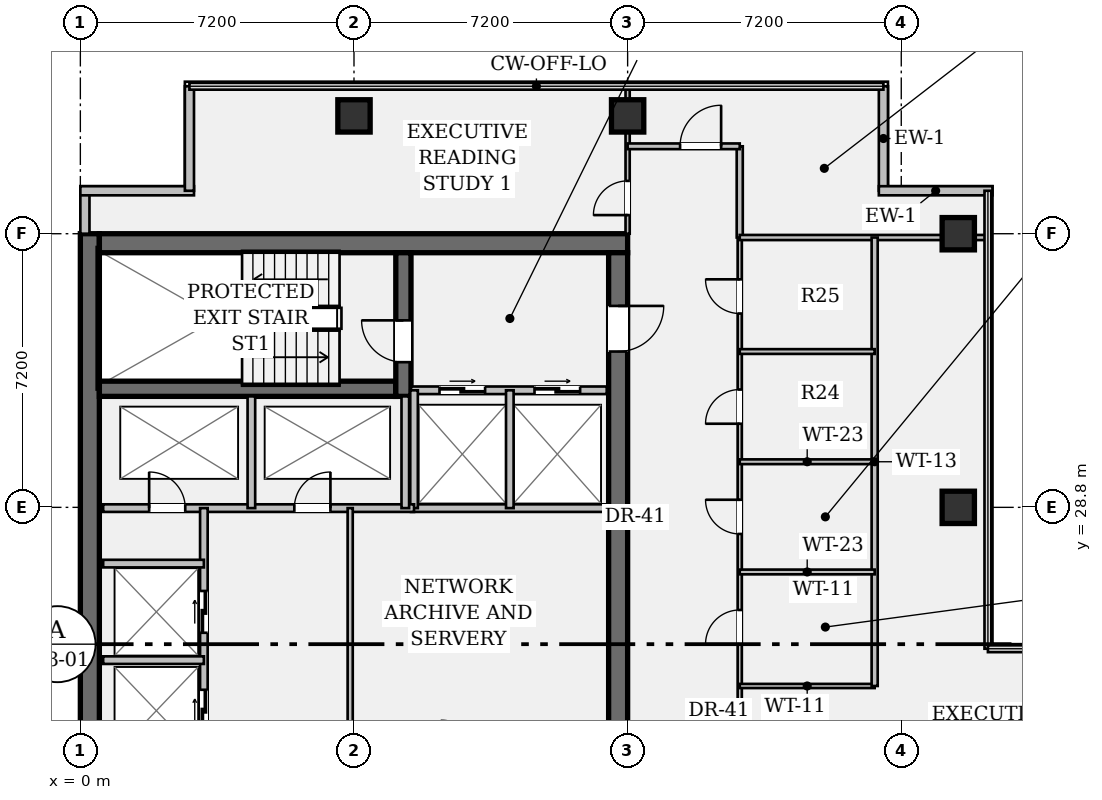
"""IFC4 building model, lengths in metres.
Left out: names, types, materials, properties, quantities, classifications, styles, units other than length and angle.
Written with IfcOpenShell. Run it as: python <this file> out.ifc"""

import sys

from ifc_helpers import new_model, si_unit, direction, frame, frame_2d, origin, origin_2d, place, context, subcontext, project, spatial, rectangle, hollow_rectangle, extrude, element, fill, save


model = new_model("IFC4")
c1 = context("Model", 3, precision=1e-05, world=origin(), true_north=direction((0.0, 1.0)))
c2 = subcontext(c1, "Body", "Model", "MODEL_VIEW")
j1 = project(units=[si_unit("LENGTHUNIT", "METRE"), si_unit("PLANEANGLEUNIT", "RADIAN")], contexts=[c1])
p1 = place(None, origin())
s1 = spatial("IfcSite", under=j1, at=p1, CompositionType="ELEMENT")
p2 = place(p1, origin())
s2 = spatial("IfcBuilding", under=s1, at=p2, CompositionType="ELEMENT")
p3 = place(p2, frame((0.0, 0.0, 180.25)))
s3 = spatial("IfcBuildingStorey", under=s2, at=p3, CompositionType="ELEMENT", Elevation=180.25)
p4 = place(p3, frame((0.25, 7.2, 0.0), z_axis=(0.0, 0.0, 1.0), x_axis=(0.0, 1.0, 0.0)))
e1 = element("IfcWall", 1, at=p4, inside=s3, PredefinedType="SHEAR", context=c2, shape_type="SweptSolid", body=[
    extrude(rectangle(XDim=28.8, YDim=0.5, at=frame_2d((14.4, 0.0))), origin(), (0.0, 0.0, 1.0), 3.24),
])
p5 = place(p3, frame((0.5, 35.75, 0.0), z_axis=(0.0, 0.0, 1.0), x_axis=(1.0, 0.0, 0.0)))
e2 = element("IfcWall", 2, at=p5, inside=s3, PredefinedType="SHEAR", context=c2, shape_type="SweptSolid", body=[
    extrude(rectangle(XDim=13.9, YDim=0.5, at=frame_2d((6.95, 0.0))), origin(), (0.0, 0.0, 1.0), 3.24),
])
p6 = place(p3, frame((14.15, 35.5, 0.0), z_axis=(0.0, 0.0, 1.0), x_axis=(0.0, -1.0, 0.0)))
e3 = element("IfcWall", 3, at=p6, inside=s3, PredefinedType="SHEAR", context=c2, shape_type="SweptSolid", body=[
    extrude(rectangle(XDim=27.8, YDim=0.5, at=frame_2d((13.9, 0.0))), origin(), (0.0, 0.0, 1.0), 3.24),
])
p7 = place(p6, frame((1.4, 0.0, 0.0)))
e4 = element("IfcOpeningElement", 4, at=p7, cuts=e3, PredefinedType="OPENING", context=c2, shape_type="SweptSolid", body=[
    extrude(rectangle(XDim=1.2, YDim=2.15, at=frame_2d((0.6, 1.075))), frame((0.0, 0.262, 0.0), z_axis=(0.0, -1.0, 0.0), x_axis=(1.0, 0.0, 0.0)), (0.0, 0.0, 1.0), 0.524),
])
p8 = place(p6, frame((25.35, 0.0, 0.0)))
e5 = element("IfcOpeningElement", 5, at=p8, cuts=e3, PredefinedType="OPENING", context=c2, shape_type="SweptSolid", body=[
    extrude(rectangle(XDim=1.2, YDim=2.15, at=frame_2d((0.6, 1.075))), frame((0.0, 0.262, 0.0), z_axis=(0.0, -1.0, 0.0), x_axis=(1.0, 0.0, 0.0)), (0.0, 0.0, 1.0), 0.524),
])
p9 = place(p6, frame((14.7, 0.0, 0.0)))
e6 = element("IfcOpeningElement", 6, at=p9, cuts=e3, PredefinedType="OPENING", context=c2, shape_type="SweptSolid", body=[
    extrude(rectangle(XDim=1.6, YDim=2.2, at=frame_2d((0.8, 1.1))), frame((0.0, 0.262, 0.0), z_axis=(0.0, -1.0, 0.0), x_axis=(1.0, 0.0, 0.0)), (0.0, 0.0, 1.0), 0.524),
])
p10 = place(p3, frame((0.5, 31.92, 0.0), z_axis=(0.0, 0.0, 1.0), x_axis=(1.0, 0.0, 0.0)))
e7 = element("IfcWall", 7, at=p10, inside=s3, PredefinedType="SHEAR", context=c2, shape_type="SweptSolid", body=[
    extrude(rectangle(XDim=7.8, YDim=0.4, at=frame_2d((3.9, 0.0))), origin(), (0.0, 0.0, 1.0), 3.24),
])
p11 = place(p3, frame((8.5, 31.72, 0.0), z_axis=(0.0, 0.0, 1.0), x_axis=(0.0, 1.0, 0.0)))
e8 = element("IfcWall", 8, at=p11, inside=s3, PredefinedType="SHEAR", context=c2, shape_type="SweptSolid", body=[
    extrude(rectangle(XDim=3.78, YDim=0.4, at=frame_2d((1.89, 0.0))), origin(), (0.0, 0.0, 1.0), 3.24),
])
p12 = place(p11, frame((0.9, 0.0, 0.0)))
e9 = element("IfcOpeningElement", 9, at=p12, cuts=e8, PredefinedType="OPENING", context=c2, shape_type="SweptSolid", body=[
    extrude(rectangle(XDim=1.1, YDim=2.15, at=frame_2d((0.55, 1.075))), frame((0.0, 0.212, 0.0), z_axis=(0.0, -1.0, 0.0), x_axis=(1.0, 0.0, 0.0)), (0.0, 0.0, 1.0), 0.424),
])
for number, where, z_axis, x_axis in (
    (10, (7.2, 39.1, 0.0), (0.0, 0.0, 1.0), (1.0, 0.0, 0.0)),
    (11, (14.4, 39.1, 0.0), (0.0, 0.0, 1.0), (1.0, 0.0, 0.0)),
    (12, (23.1, 28.8, 0.0), (0.0, 0.0, 1.0), (1.0, 0.0, 0.0)),
    (13, (23.1, 36.0, 0.0), (0.0, 0.0, 1.0), (1.0, 0.0, 0.0)),
):
    element("IfcColumn", number, at=place(p3, frame(where, z_axis=z_axis, x_axis=x_axis)), inside=s3, PredefinedType="COLUMN", context=c2, shape_type="SweptSolid", body=[
        extrude(hollow_rectangle(XDim=0.85, YDim=0.85, WallThickness=0.05, at=origin_2d()), origin(), (0.0, 0.0, 1.0), 3.24),
    ])
p13 = place(p3, frame((0.12, 36.0, 0.0), z_axis=(0.0, 0.0, 1.0), x_axis=(0.0, 1.0, 0.0)))
e14 = element("IfcWall", 14, at=p13, inside=s3, PredefinedType="STANDARD", context=c2, shape_type="SweptSolid", body=[
    extrude(rectangle(XDim=1.13, YDim=0.24, at=frame_2d((0.565, 0.0))), origin(), (0.0, 0.0, 1.0), 3.24),
])
p14 = place(p3, frame((0.0, 37.13, 0.0), z_axis=(0.0, 0.0, 1.0), x_axis=(1.0, 0.0, 0.0)))
e15 = element("IfcWall", 15, at=p14, inside=s3, PredefinedType="STANDARD", context=c2, shape_type="SweptSolid", body=[
    extrude(rectangle(XDim=2.99, YDim=0.24, at=frame_2d((1.495, 0.0))), origin(), (0.0, 0.0, 1.0), 3.24),
])
for number, where, z_axis, x_axis in (
    (16, (2.87, 37.13, 0.0), (0.0, 0.0, 1.0), (0.0, 1.0, 0.0)),
    (17, (21.13, 39.88, 0.0), (0.0, 0.0, 1.0), (0.0, -1.0, 0.0)),
):
    element("IfcWall", number, at=place(p3, frame(where, z_axis=z_axis, x_axis=x_axis)), inside=s3, PredefinedType="STANDARD", context=c2, shape_type="SweptSolid", body=[
        extrude(rectangle(XDim=2.75, YDim=0.24, at=frame_2d((1.375, 0.0))), origin(), (0.0, 0.0, 1.0), 3.24),
    ])
p15 = place(p3, frame((21.01, 37.13, 0.0), z_axis=(0.0, 0.0, 1.0), x_axis=(1.0, 0.0, 0.0)))
e18 = element("IfcWall", 18, at=p15, inside=s3, PredefinedType="STANDARD", context=c2, shape_type="SweptSolid", body=[
    extrude(rectangle(XDim=2.99, YDim=0.24, at=frame_2d((1.495, 0.0))), origin(), (0.0, 0.0, 1.0), 3.24),
])
p16 = place(p3, frame((8.7, 31.88, 0.0), z_axis=(0.0, 0.0, 1.0), x_axis=(1.0, 0.0, 0.0)))
e19 = element("IfcWall", 19, at=p16, inside=s3, PredefinedType="PARTITIONING", context=c2, shape_type="SweptSolid", body=[
    extrude(rectangle(XDim=5.15, YDim=0.2, at=frame_2d((2.575, 0.0))), origin(), (0.0, 0.0, 1.0), 3.24),
])
p17 = place(p16, frame((0.75, 0.0, 0.0)))
e20 = element("IfcOpeningElement", 20, at=p17, cuts=e19, PredefinedType="OPENING", context=c2, shape_type="SweptSolid", body=[
    extrude(rectangle(XDim=1.2, YDim=2.2, at=frame_2d((0.6, 1.1))), frame((0.0, 0.112, 0.0), z_axis=(0.0, -1.0, 0.0), x_axis=(1.0, 0.0, 0.0)), (0.0, 0.0, 1.0), 0.224),
])
p18 = place(p16, frame((3.25, 0.0, 0.0)))
e21 = element("IfcOpeningElement", 21, at=p18, cuts=e19, PredefinedType="OPENING", context=c2, shape_type="SweptSolid", body=[
    extrude(rectangle(XDim=1.2, YDim=2.2, at=frame_2d((0.6, 1.1))), frame((0.0, 0.112, 0.0), z_axis=(0.0, -1.0, 0.0), x_axis=(1.0, 0.0, 0.0)), (0.0, 0.0, 1.0), 0.224),
])
p19 = place(p3, frame((8.7, 28.78, 0.0), z_axis=(0.0, 0.0, 1.0), x_axis=(1.0, 0.0, 0.0)))
e22 = element("IfcWall", 22, at=p19, inside=s3, PredefinedType="PARTITIONING", context=c2, shape_type="SweptSolid", body=[
    extrude(rectangle(XDim=5.15, YDim=0.2, at=frame_2d((2.575, 0.0))), origin(), (0.0, 0.0, 1.0), 3.24),
])
for number, where, z_axis, x_axis in (
    (23, (8.78, 28.78, 0.0), (0.0, 0.0, 1.0), (0.0, 1.0, 0.0)),
    (24, (11.3, 28.78, 0.0), (0.0, 0.0, 1.0), (0.0, 1.0, 0.0)),
):
    element("IfcWall", number, at=place(p3, frame(where, z_axis=z_axis, x_axis=x_axis)), inside=s3, PredefinedType="PARTITIONING", context=c2, shape_type="SweptSolid", body=[
        extrude(rectangle(XDim=3.1, YDim=0.2, at=frame_2d((1.55, 0.0))), origin(), (0.0, 0.0, 1.0), 3.24),
    ])
p20 = place(p3, frame((0.6, 28.78, 0.0), z_axis=(0.0, 0.0, 1.0), x_axis=(1.0, 0.0, 0.0)))
e25 = element("IfcWall", 25, at=p20, inside=s3, PredefinedType="PARTITIONING", context=c2, shape_type="SweptSolid", body=[
    extrude(rectangle(XDim=8.18, YDim=0.2, at=frame_2d((4.09, 0.0))), origin(), (0.0, 0.0, 1.0), 3.24),
])
p21 = place(p20, frame((1.21, 0.0, 0.0)))
e26 = element("IfcOpeningElement", 26, at=p21, cuts=e25, PredefinedType="OPENING", context=c2, shape_type="SweptSolid", body=[
    extrude(rectangle(XDim=0.95, YDim=2.15, at=frame_2d((0.475, 1.075))), frame((0.0, 0.112, 0.0), z_axis=(0.0, -1.0, 0.0), x_axis=(1.0, 0.0, 0.0)), (0.0, 0.0, 1.0), 0.224),
])
p22 = place(p20, frame((5.03, 0.0, 0.0)))
e27 = element("IfcOpeningElement", 27, at=p22, cuts=e25, PredefinedType="OPENING", context=c2, shape_type="SweptSolid", body=[
    extrude(rectangle(XDim=0.95, YDim=2.15, at=frame_2d((0.475, 1.075))), frame((0.0, 0.112, 0.0), z_axis=(0.0, -1.0, 0.0), x_axis=(1.0, 0.0, 0.0)), (0.0, 0.0, 1.0), 0.224),
])
for number, where, z_axis, x_axis in (
    (28, (4.5, 28.78, 0.0), (0.0, 0.0, 1.0), (0.0, 1.0, 0.0)),
    (29, (8.55, 28.78, 0.0), (0.0, 0.0, 1.0), (0.0, 1.0, 0.0)),
):
    element("IfcWall", number, at=place(p3, frame(where, z_axis=z_axis, x_axis=x_axis)), inside=s3, PredefinedType="PARTITIONING", context=c2, shape_type="SweptSolid", body=[
        extrude(rectangle(XDim=2.94, YDim=0.2, at=frame_2d((1.47, 0.0))), origin(), (0.0, 0.0, 1.0), 3.24),
    ])
p23 = place(p3, frame((3.25, 15.7, 0.0), z_axis=(0.0, 0.0, 1.0), x_axis=(0.0, 1.0, 0.0)))
e30 = element("IfcWall", 30, at=p23, inside=s3, PredefinedType="PARTITIONING", context=c2, shape_type="SweptSolid", body=[
    extrude(rectangle(XDim=13.08, YDim=0.2, at=frame_2d((6.54, 0.0))), origin(), (0.0, 0.0, 1.0), 3.24),
])
p24 = place(p23, frame((0.9, 0.0, 0.0)))
e31 = element("IfcOpeningElement", 31, at=p24, cuts=e30, PredefinedType="OPENING", context=c2, shape_type="SweptSolid", body=[
    extrude(rectangle(XDim=1.1, YDim=2.2, at=frame_2d((0.55, 1.1))), frame((0.0, 0.112, 0.0), z_axis=(0.0, -1.0, 0.0), x_axis=(1.0, 0.0, 0.0)), (0.0, 0.0, 1.0), 0.224),
])
p25 = place(p23, frame((3.5, 0.0, 0.0)))
e32 = element("IfcOpeningElement", 32, at=p25, cuts=e30, PredefinedType="OPENING", context=c2, shape_type="SweptSolid", body=[
    extrude(rectangle(XDim=1.1, YDim=2.2, at=frame_2d((0.55, 1.1))), frame((0.0, 0.112, 0.0), z_axis=(0.0, -1.0, 0.0), x_axis=(1.0, 0.0, 0.0)), (0.0, 0.0, 1.0), 0.224),
])
p26 = place(p23, frame((7.2, 0.0, 0.0)))
e33 = element("IfcOpeningElement", 33, at=p26, cuts=e30, PredefinedType="OPENING", context=c2, shape_type="SweptSolid", body=[
    extrude(rectangle(XDim=1.1, YDim=2.2, at=frame_2d((0.55, 1.1))), frame((0.0, 0.112, 0.0), z_axis=(0.0, -1.0, 0.0), x_axis=(1.0, 0.0, 0.0)), (0.0, 0.0, 1.0), 0.224),
])
p27 = place(p23, frame((9.8, 0.0, 0.0)))
e34 = element("IfcOpeningElement", 34, at=p27, cuts=e30, PredefinedType="OPENING", context=c2, shape_type="SweptSolid", body=[
    extrude(rectangle(XDim=1.1, YDim=2.2, at=frame_2d((0.55, 1.1))), frame((0.0, 0.112, 0.0), z_axis=(0.0, -1.0, 0.0), x_axis=(1.0, 0.0, 0.0)), (0.0, 0.0, 1.0), 0.224),
])
for number, where, z_axis, x_axis in (
    (35, (0.6, 24.78, 0.0), (0.0, 0.0, 1.0), (1.0, 0.0, 0.0)),
    (36, (0.6, 27.32, 0.0), (0.0, 0.0, 1.0), (1.0, 0.0, 0.0)),
):
    element("IfcWall", number, at=place(p3, frame(where, z_axis=z_axis, x_axis=x_axis)), inside=s3, PredefinedType="PARTITIONING", context=c2, shape_type="SweptSolid", body=[
        extrude(rectangle(XDim=2.65, YDim=0.2, at=frame_2d((1.325, 0.0))), origin(), (0.0, 0.0, 1.0), 3.24),
    ])
p28 = place(p3, frame((7.1, 22.2, 0.0), z_axis=(0.0, 0.0, 1.0), x_axis=(0.0, 1.0, 0.0)))
e37 = element("IfcWall", 37, at=p28, inside=s3, PredefinedType="PARTITIONING", context=c2, shape_type="SweptSolid", body=[
    extrude(rectangle(XDim=6.58, YDim=0.135, at=frame_2d((3.29, 0.0))), origin(), (0.0, 0.0, 1.0), 3.24),
])
p29 = place(p3, frame((17.35, 17.35, 0.0), z_axis=(0.0, 0.0, 1.0), x_axis=(0.0, 1.0, 0.0)))
e38 = element("IfcWall", 38, at=p29, inside=s3, PredefinedType="PARTITIONING", context=c2, shape_type="SweptSolid", body=[
    extrude(rectangle(XDim=18.55, YDim=0.11, at=frame_2d((9.275, 0.0))), origin(), (0.0, 0.0, 1.0), 2.603),
])
p30 = place(p29, frame((7.85, 0.0, 0.0)))
e39 = element("IfcOpeningElement", 39, at=p30, cuts=e38, PredefinedType="OPENING", context=c2, shape_type="SweptSolid", body=[
    extrude(rectangle(XDim=0.9, YDim=2.15, at=frame_2d((0.45, 1.075))), frame((0.0, 0.067, 0.0), z_axis=(0.0, -1.0, 0.0), x_axis=(1.0, 0.0, 0.0)), (0.0, 0.0, 1.0), 0.134),
])
p31 = place(p29, frame((10.75, 0.0, 0.0)))
e40 = element("IfcOpeningElement", 40, at=p31, cuts=e38, PredefinedType="OPENING", context=c2, shape_type="SweptSolid", body=[
    extrude(rectangle(XDim=0.9, YDim=2.15, at=frame_2d((0.45, 1.075))), frame((0.0, 0.067, 0.0), z_axis=(0.0, -1.0, 0.0), x_axis=(1.0, 0.0, 0.0)), (0.0, 0.0, 1.0), 0.134),
])
p32 = place(p29, frame((13.65, 0.0, 0.0)))
e41 = element("IfcOpeningElement", 41, at=p32, cuts=e38, PredefinedType="OPENING", context=c2, shape_type="SweptSolid", body=[
    extrude(rectangle(XDim=0.9, YDim=2.15, at=frame_2d((0.45, 1.075))), frame((0.0, 0.067, 0.0), z_axis=(0.0, -1.0, 0.0), x_axis=(1.0, 0.0, 0.0)), (0.0, 0.0, 1.0), 0.134),
])
p33 = place(p29, frame((16.55, 0.0, 0.0)))
e42 = element("IfcOpeningElement", 42, at=p33, cuts=e38, PredefinedType="OPENING", context=c2, shape_type="SweptSolid", body=[
    extrude(rectangle(XDim=0.9, YDim=2.15, at=frame_2d((0.45, 1.075))), frame((0.0, 0.067, 0.0), z_axis=(0.0, -1.0, 0.0), x_axis=(1.0, 0.0, 0.0)), (0.0, 0.0, 1.0), 0.134),
])
p34 = place(p3, frame((14.4, 36.0, 0.0), z_axis=(0.0, 0.0, 1.0), x_axis=(0.0, 1.0, 0.0)))
e43 = element("IfcWall", 43, at=p34, inside=s3, PredefinedType="PARTITIONING", context=c2, shape_type="SweptSolid", body=[
    extrude(rectangle(XDim=3.88, YDim=0.11, at=frame_2d((1.94, 0.0))), origin(), (0.0, 0.0, 1.0), 2.603),
])
p35 = place(p34, frame((0.49, 0.0, 0.0)))
e44 = element("IfcOpeningElement", 44, at=p35, cuts=e43, PredefinedType="OPENING", context=c2, shape_type="SweptSolid", body=[
    extrude(rectangle(XDim=0.9, YDim=2.15, at=frame_2d((0.45, 1.075))), frame((0.0, 0.067, 0.0), z_axis=(0.0, -1.0, 0.0), x_axis=(1.0, 0.0, 0.0)), (0.0, 0.0, 1.0), 0.134),
])
p36 = place(p3, frame((17.35, 35.9, 0.0), z_axis=(0.0, 0.0, 1.0), x_axis=(0.0, 1.0, 0.0)))
e45 = element("IfcWall", 45, at=p36, inside=s3, PredefinedType="PARTITIONING", context=c2, shape_type="SweptSolid", body=[
    extrude(rectangle(XDim=2.4, YDim=0.16, at=frame_2d((1.2, 0.0))), origin(), (0.0, 0.0, 1.0), 2.603),
])
p37 = place(p3, frame((14.4, 38.3, 0.0), z_axis=(0.0, 0.0, 1.0), x_axis=(1.0, 0.0, 0.0)))
e46 = element("IfcWall", 46, at=p37, inside=s3, PredefinedType="PARTITIONING", context=c2, shape_type="SweptSolid", body=[
    extrude(rectangle(XDim=2.95, YDim=0.15, at=frame_2d((1.475, 0.0))), origin(), (0.0, 0.0, 1.0), 2.603),
])
p38 = place(p37, frame((1.38, 0.0, 0.0)))
e47 = element("IfcOpeningElement", 47, at=p38, cuts=e46, PredefinedType="OPENING", context=c2, shape_type="SweptSolid", body=[
    extrude(rectangle(XDim=1.08, YDim=2.15, at=frame_2d((0.54, 1.075))), frame((0.0, 0.087, 0.0), z_axis=(0.0, -1.0, 0.0), x_axis=(1.0, 0.0, 0.0)), (0.0, 0.0, 1.0), 0.174),
])
p39 = place(p3, frame((17.35, 35.9, 0.0), z_axis=(0.0, 0.0, 1.0), x_axis=(1.0, 0.0, 0.0)))
e48 = element("IfcWall", 48, at=p39, inside=s3, PredefinedType="PARTITIONING", context=c2, shape_type="SweptSolid", body=[
    extrude(rectangle(XDim=6.53, YDim=0.135, at=frame_2d((3.265, 0.0))), origin(), (0.0, 0.0, 1.0), 2.603),
])
p40 = place(p3, frame((17.35, 24.1, 0.0), z_axis=(0.0, 0.0, 1.0), x_axis=(1.0, 0.0, 0.0)))
e49 = element("IfcWall", 49, at=p40, inside=s3, PredefinedType="PARTITIONING", context=c2, shape_type="SweptSolid", body=[
    extrude(rectangle(XDim=3.55, YDim=0.11, at=frame_2d((1.775, 0.0))), origin(), (0.0, 0.0, 1.0), 2.808),
])
p41 = place(p3, frame((20.9, 24.1, 0.0), z_axis=(0.0, 0.0, 1.0), x_axis=(0.0, 1.0, 0.0)))
e50 = element("IfcWall", 50, at=p41, inside=s3, PredefinedType="PARTITIONING", context=c2, shape_type="SweptSolid", body=[
    extrude(rectangle(XDim=11.8, YDim=0.16, at=frame_2d((5.9, 0.0))), origin(), (0.0, 0.0, 1.0), 2.603),
])
for number, where, z_axis, x_axis in (
    (51, (17.35, 27.1, 0.0), (0.0, 0.0, 1.0), (1.0, 0.0, 0.0)),
    (52, (17.35, 30.0, 0.0), (0.0, 0.0, 1.0), (1.0, 0.0, 0.0)),
    (53, (17.35, 32.9, 0.0), (0.0, 0.0, 1.0), (1.0, 0.0, 0.0)),
):
    element("IfcWall", number, at=place(p3, frame(where, z_axis=z_axis, x_axis=x_axis)), inside=s3, PredefinedType="PARTITIONING", context=c2, shape_type="SweptSolid", body=[
        extrude(rectangle(XDim=3.55, YDim=0.125, at=frame_2d((1.775, 0.0))), origin(), (0.0, 0.0, 1.0), 2.808),
    ])
p42 = place(p12, origin())
e54 = element("IfcDoor", 54, at=p42, inside=s3, OperationType="SINGLE_SWING_RIGHT", PredefinedType="DOOR", context=c2, shape_type="SweptSolid", body=[
    extrude(rectangle(XDim=1.1, YDim=2.15, at=frame_2d((0.55, 1.075))), frame((0.0, 0.025, 0.0), z_axis=(0.0, -1.0, 0.0), x_axis=(1.0, 0.0, 0.0)), (0.0, 0.0, 1.0), 0.05),
])
fill(e9, e54)
p43 = place(p7, origin())
e55 = element("IfcDoor", 55, at=p43, inside=s3, OperationType="SINGLE_SWING_LEFT", PredefinedType="DOOR", context=c2, shape_type="SweptSolid", body=[
    extrude(rectangle(XDim=1.2, YDim=2.15, at=frame_2d((0.6, 1.075))), frame((0.0, 0.025, 0.0), z_axis=(0.0, -1.0, 0.0), x_axis=(1.0, 0.0, 0.0)), (0.0, 0.0, 1.0), 0.05),
])
fill(e4, e55)
p44 = place(p17, origin())
e56 = element("IfcDoor", 56, at=p44, inside=s3, OperationType="DOUBLE_DOOR_SLIDING", PredefinedType="DOOR", context=c2, shape_type="SweptSolid", body=[
    extrude(rectangle(XDim=1.2, YDim=2.2, at=frame_2d((0.6, 1.1))), frame((0.0, 0.025, 0.0), z_axis=(0.0, -1.0, 0.0), x_axis=(1.0, 0.0, 0.0)), (0.0, 0.0, 1.0), 0.05),
])
fill(e20, e56)
p45 = place(p18, origin())
e57 = element("IfcDoor", 57, at=p45, inside=s3, OperationType="DOUBLE_DOOR_SLIDING", PredefinedType="DOOR", context=c2, shape_type="SweptSolid", body=[
    extrude(rectangle(XDim=1.2, YDim=2.2, at=frame_2d((0.6, 1.1))), frame((0.0, 0.025, 0.0), z_axis=(0.0, -1.0, 0.0), x_axis=(1.0, 0.0, 0.0)), (0.0, 0.0, 1.0), 0.05),
])
fill(e21, e57)
p46 = place(p21, origin())
e58 = element("IfcDoor", 58, at=p46, inside=s3, OperationType="SINGLE_SWING_LEFT", PredefinedType="DOOR", context=c2, shape_type="SweptSolid", body=[
    extrude(rectangle(XDim=0.95, YDim=2.15, at=frame_2d((0.475, 1.075))), frame((0.0, 0.025, 0.0), z_axis=(0.0, -1.0, 0.0), x_axis=(1.0, 0.0, 0.0)), (0.0, 0.0, 1.0), 0.05),
])
fill(e26, e58)
p47 = place(p22, origin())
e59 = element("IfcDoor", 59, at=p47, inside=s3, OperationType="SINGLE_SWING_RIGHT", PredefinedType="DOOR", context=c2, shape_type="SweptSolid", body=[
    extrude(rectangle(XDim=0.95, YDim=2.15, at=frame_2d((0.475, 1.075))), frame((0.0, 0.025, 0.0), z_axis=(0.0, -1.0, 0.0), x_axis=(1.0, 0.0, 0.0)), (0.0, 0.0, 1.0), 0.05),
])
fill(e27, e59)
p48 = place(p26, origin())
e60 = element("IfcDoor", 60, at=p48, inside=s3, OperationType="DOUBLE_DOOR_SLIDING", PredefinedType="DOOR", context=c2, shape_type="SweptSolid", body=[
    extrude(rectangle(XDim=1.1, YDim=2.2, at=frame_2d((0.55, 1.1))), frame((0.0, 0.025, 0.0), z_axis=(0.0, -1.0, 0.0), x_axis=(1.0, 0.0, 0.0)), (0.0, 0.0, 1.0), 0.05),
])
fill(e33, e60)
p49 = place(p27, origin())
e61 = element("IfcDoor", 61, at=p49, inside=s3, OperationType="DOUBLE_DOOR_SLIDING", PredefinedType="DOOR", context=c2, shape_type="SweptSolid", body=[
    extrude(rectangle(XDim=1.1, YDim=2.2, at=frame_2d((0.55, 1.1))), frame((0.0, 0.025, 0.0), z_axis=(0.0, -1.0, 0.0), x_axis=(1.0, 0.0, 0.0)), (0.0, 0.0, 1.0), 0.05),
])
fill(e34, e61)
p50 = place(p35, origin())
e62 = element("IfcDoor", 62, at=p50, inside=s3, OperationType="SINGLE_SWING_LEFT", PredefinedType="DOOR", context=c2, shape_type="SweptSolid", body=[
    extrude(rectangle(XDim=0.9, YDim=2.15, at=frame_2d((0.45, 1.075))), frame((0.0, 0.025, 0.0), z_axis=(0.0, -1.0, 0.0), x_axis=(1.0, 0.0, 0.0)), (0.0, 0.0, 1.0), 0.05),
])
fill(e44, e62)
p51 = place(p38, origin())
e63 = element("IfcDoor", 63, at=p51, inside=s3, OperationType="SINGLE_SWING_RIGHT", PredefinedType="DOOR", context=c2, shape_type="SweptSolid", body=[
    extrude(rectangle(XDim=1.08, YDim=2.15, at=frame_2d((0.54, 1.075))), frame((0.0, 0.025, 0.0), z_axis=(0.0, -1.0, 0.0), x_axis=(1.0, 0.0, 0.0)), (0.0, 0.0, 1.0), 0.05),
])
fill(e47, e63)
p52 = place(p30, origin())
e64 = element("IfcDoor", 64, at=p52, inside=s3, OperationType="SINGLE_SWING_LEFT", PredefinedType="DOOR", context=c2, shape_type="SweptSolid", body=[
    extrude(rectangle(XDim=0.9, YDim=2.15, at=frame_2d((0.45, 1.075))), frame((0.0, 0.025, 0.0), z_axis=(0.0, -1.0, 0.0), x_axis=(1.0, 0.0, 0.0)), (0.0, 0.0, 1.0), 0.05),
])
fill(e39, e64)
p53 = place(p31, origin())
e65 = element("IfcDoor", 65, at=p53, inside=s3, OperationType="SINGLE_SWING_RIGHT", PredefinedType="DOOR", context=c2, shape_type="SweptSolid", body=[
    extrude(rectangle(XDim=0.9, YDim=2.15, at=frame_2d((0.45, 1.075))), frame((0.0, 0.025, 0.0), z_axis=(0.0, -1.0, 0.0), x_axis=(1.0, 0.0, 0.0)), (0.0, 0.0, 1.0), 0.05),
])
fill(e40, e65)
p54 = place(p32, origin())
e66 = element("IfcDoor", 66, at=p54, inside=s3, OperationType="SINGLE_SWING_LEFT", PredefinedType="DOOR", context=c2, shape_type="SweptSolid", body=[
    extrude(rectangle(XDim=0.9, YDim=2.15, at=frame_2d((0.45, 1.075))), frame((0.0, 0.025, 0.0), z_axis=(0.0, -1.0, 0.0), x_axis=(1.0, 0.0, 0.0)), (0.0, 0.0, 1.0), 0.05),
])
fill(e41, e66)
p55 = place(p33, origin())
e67 = element("IfcDoor", 67, at=p55, inside=s3, OperationType="SINGLE_SWING_RIGHT", PredefinedType="DOOR", context=c2, shape_type="SweptSolid", body=[
    extrude(rectangle(XDim=0.9, YDim=2.15, at=frame_2d((0.45, 1.075))), frame((0.0, 0.025, 0.0), z_axis=(0.0, -1.0, 0.0), x_axis=(1.0, 0.0, 0.0)), (0.0, 0.0, 1.0), 0.05),
])
fill(e42, e67)
save(model, sys.argv[1])
